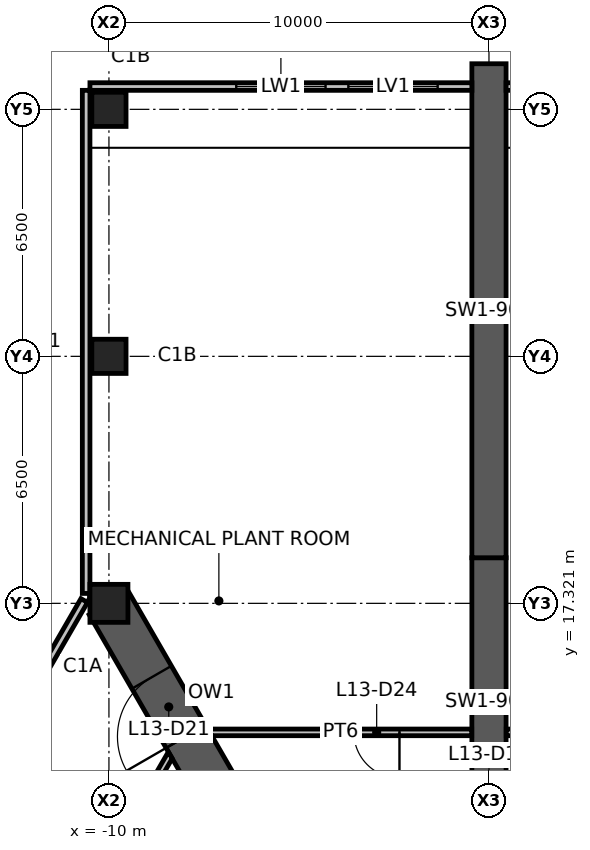
"""IFC4 building model, lengths in metres.
Left out: names, types, materials, properties, quantities, classifications, styles, units other than length and angle.
Written with IfcOpenShell. Run it as: python <this file> out.ifc"""

import sys

from ifc_helpers import new_model, si_unit, direction, frame, frame_2d, origin, origin_2d, place, context, subcontext, project, spatial, polyline, rectangle, hollow_rectangle, outline, extrude, element, fill, save


model = new_model("IFC4")
c1 = context("Model", 3, precision=1e-05, world=origin(), true_north=direction((0.0, 1.0)))
c2 = subcontext(c1, "Body", "Model", "MODEL_VIEW")
j1 = project(units=[si_unit("LENGTHUNIT", "METRE"), si_unit("PLANEANGLEUNIT", "RADIAN")], contexts=[c1])
p1 = place(None, origin())
s1 = spatial("IfcSite", under=j1, at=p1, CompositionType="ELEMENT")
p2 = place(p1, origin())
s2 = spatial("IfcBuilding", under=s1, at=p2, CompositionType="ELEMENT")
p3 = place(p2, frame((0.0, 0.0, 52.0)))
s3 = spatial("IfcBuildingStorey", under=s2, at=p3, CompositionType="ELEMENT", Elevation=52.0)
p4 = place(p3, frame((-10.0, 17.321, 0.0), z_axis=(0.0, 0.0, 1.0), x_axis=(1.0, 0.0, 0.0)))
e1 = element("IfcColumn", 1, at=p4, inside=s3, PredefinedType="COLUMN", context=c2, shape_type="SweptSolid", body=[
    extrude(hollow_rectangle(XDim=1.0, YDim=1.0, WallThickness=0.06, at=origin_2d()), origin(), (0.0, 0.0, 1.0), 5.0),
])
for number, where, z_axis, x_axis in (
    (2, (-10.0, 23.821, 0.0), (0.0, 0.0, 1.0), (1.0, 0.0, 0.0)),
    (3, (-10.0, 30.321, 0.0), (0.0, 0.0, 1.0), (1.0, 0.0, 0.0)),
):
    element("IfcColumn", number, at=place(p3, frame(where, z_axis=z_axis, x_axis=x_axis)), inside=s3, PredefinedType="COLUMN", context=c2, shape_type="SweptSolid", body=[
        extrude(hollow_rectangle(XDim=0.9, YDim=0.9, WallThickness=0.05, at=origin_2d()), origin(), (0.0, 0.0, 1.0), 5.0),
    ])
p5 = place(p3, frame((0.0, 10.925, 0.0), z_axis=(0.0, 0.0, 1.0), x_axis=(0.0, 1.0, 0.0)))
e4 = element("IfcWall", 4, at=p5, inside=s3, PredefinedType="SHEAR", context=c2, shape_type="SweptSolid", body=[
    extrude(rectangle(XDim=7.595, YDim=0.9, at=frame_2d((3.798, 0.0))), origin(), (0.0, 0.0, 1.0), 5.0),
])
p6 = place(p5, frame((0.8, 0.0, 0.0)))
e5 = element("IfcOpeningElement", 5, at=p6, cuts=e4, PredefinedType="OPENING", context=c2, shape_type="SweptSolid", body=[
    extrude(rectangle(XDim=1.0, YDim=2.1, at=frame_2d((0.5, 1.05))), frame((0.0, 0.46, 0.0), z_axis=(0.0, -1.0, 0.0), x_axis=(1.0, 0.0, 0.0)), (0.0, 0.0, 1.0), 0.92),
])
p7 = place(p3, frame((0.0, 18.521, 0.0), z_axis=(0.0, 0.0, 1.0), x_axis=(0.0, 1.0, 0.0)))
e6 = element("IfcWall", 6, at=p7, inside=s3, PredefinedType="SHEAR", context=c2, shape_type="SweptSolid", body=[
    extrude(rectangle(XDim=13.0, YDim=0.9, at=frame_2d((6.5, 0.0))), origin(), (0.0, 0.0, 1.0), 5.0),
])
p8 = place(p3, frame((-6.308, 10.925, -1.15), z_axis=(0.0, 0.0, 1.0), x_axis=(-0.499993363642, 0.866029235253, 0.0)))
e7 = element("IfcWall", 7, at=p8, inside=s3, PredefinedType="SHEAR", context=c2, shape_type="SweptSolid", body=[
    extrude(outline(polyline([(-0.346, -0.6), (3.338, -0.6), (5.138, -0.6), (7.385, -0.6), (7.385, 0.6), (5.138, 0.6), (3.338, 0.6), (-0.346, 0.6), (0.0, 0.0), (-0.346, -0.6)])), origin(), (0.0, 0.0, 1.0), 6.15),
])
p9 = place(p8, frame((3.338, 0.0, 1.15)))
e8 = element("IfcOpeningElement", 8, at=p9, cuts=e7, PredefinedType="OPENING", context=c2, shape_type="SweptSolid", body=[
    extrude(rectangle(XDim=1.8, YDim=2.4, at=frame_2d((0.9, 1.2))), frame((0.0, 0.61, 0.0), z_axis=(0.0, -1.0, 0.0), x_axis=(1.0, 0.0, 0.0)), (0.0, 0.0, 1.0), 1.22),
])
p10 = place(p3, frame((10.5, 30.92, 0.0), z_axis=(0.0, 0.0, 1.0), x_axis=(-1.0, 0.0, 0.0)))
e9 = element("IfcWall", 9, at=p10, inside=s3, PredefinedType="ELEMENTEDWALL", context=c2, shape_type="SweptSolid", body=[
    extrude(rectangle(XDim=10.05, YDim=0.2, at=frame_2d((5.025, 0.0))), origin(), (0.0, 0.0, 1.0), 5.0),
])
p11 = place(p10, frame((3.85, 0.0, 0.6)))
e10 = element("IfcOpeningElement", 10, at=p11, cuts=e9, PredefinedType="OPENING", context=c2, shape_type="SweptSolid", body=[
    extrude(rectangle(XDim=2.35, YDim=3.6, at=frame_2d((1.175, 1.8))), frame((0.0, 0.11, 0.0), z_axis=(0.0, -1.0, 0.0), x_axis=(1.0, 0.0, 0.0)), (0.0, 0.0, 1.0), 0.22),
])
p12 = place(p10, frame((6.8, 0.0, 0.6)))
e11 = element("IfcOpeningElement", 11, at=p12, cuts=e9, PredefinedType="OPENING", context=c2, shape_type="SweptSolid", body=[
    extrude(rectangle(XDim=2.35, YDim=3.6, at=frame_2d((1.175, 1.8))), frame((0.0, 0.11, 0.0), z_axis=(0.0, -1.0, 0.0), x_axis=(1.0, 0.0, 0.0)), (0.0, 0.0, 1.0), 0.22),
])
p13 = place(p3, frame((-0.45, 30.92, 0.0), z_axis=(0.0, 0.0, 1.0), x_axis=(-1.0, 0.0, 0.0)))
e12 = element("IfcWall", 12, at=p13, inside=s3, PredefinedType="ELEMENTEDWALL", context=c2, shape_type="SweptSolid", body=[
    extrude(rectangle(XDim=10.05, YDim=0.2, at=frame_2d((5.025, 0.0))), origin(), (0.0, 0.0, 1.0), 5.0),
])
p14 = place(p13, frame((0.9, 0.0, 0.6)))
e13 = element("IfcOpeningElement", 13, at=p14, cuts=e12, PredefinedType="OPENING", context=c2, shape_type="SweptSolid", body=[
    extrude(rectangle(XDim=2.35, YDim=3.6, at=frame_2d((1.175, 1.8))), frame((0.0, 0.11, 0.0), z_axis=(0.0, -1.0, 0.0), x_axis=(1.0, 0.0, 0.0)), (0.0, 0.0, 1.0), 0.22),
])
p15 = place(p13, frame((3.85, 0.0, 0.6)))
e14 = element("IfcOpeningElement", 14, at=p15, cuts=e12, PredefinedType="OPENING", context=c2, shape_type="SweptSolid", body=[
    extrude(rectangle(XDim=2.35, YDim=3.6, at=frame_2d((1.175, 1.8))), frame((0.0, 0.11, 0.0), z_axis=(0.0, -1.0, 0.0), x_axis=(1.0, 0.0, 0.0)), (0.0, 0.0, 1.0), 0.22),
])
p16 = place(p3, frame((-10.6, 30.821, 0.0), z_axis=(0.0, 0.0, 1.0), x_axis=(0.0, -1.0, 0.0)))
e15 = element("IfcWall", 15, at=p16, inside=s3, PredefinedType="ELEMENTEDWALL", context=c2, shape_type="SweptSolid", body=[
    extrude(rectangle(XDim=13.239, YDim=0.2, at=frame_2d((6.62, 0.0))), origin(), (0.0, 0.0, 1.0), 5.0),
])
p17 = place(p3, frame((-10.65, 17.395, 0.0), z_axis=(0.0, 0.0, 1.0), x_axis=(-0.499999841607, -0.866025495233, 0.0)))
e16 = element("IfcWall", 16, at=p17, inside=s3, PredefinedType="ELEMENTEDWALL", context=c2, shape_type="SweptSolid", body=[
    extrude(rectangle(XDim=19.479, YDim=0.2, at=frame_2d((9.739, 0.0))), origin(), (0.0, 0.0, 1.0), 5.0),
])
p18 = place(p3, frame((7.347, 13.925, 0.0), z_axis=(0.0, 0.0, 1.0), x_axis=(-1.0, 0.0, 0.0)))
e17 = element("IfcWall", 17, at=p18, inside=s3, PredefinedType="PARTITIONING", context=c2, shape_type="SweptSolid", body=[
    extrude(outline(polyline([(-0.051, -0.087), (6.892, -0.087), (6.892, 0.087), (0.051, 0.087), (-0.051, -0.087)])), origin(), (0.0, 0.0, 1.0), 4.83),
])
p19 = place(p3, frame((-0.455, 13.925, 0.0), z_axis=(0.0, 0.0, 1.0), x_axis=(-1.0, 0.0, 0.0)))
e18 = element("IfcWall", 18, at=p19, inside=s3, PredefinedType="PARTITIONING", context=c2, shape_type="SweptSolid", body=[
    extrude(outline(polyline([(0.0, -0.087), (1.9, -0.087), (3.1, -0.087), (6.942, -0.087), (6.841, 0.087), (3.1, 0.087), (1.9, 0.087), (0.0, 0.087), (0.0, -0.087)])), origin(), (0.0, 0.0, 1.0), 4.83),
])
p20 = place(p19, frame((1.9, 0.0, 0.0)))
e19 = element("IfcOpeningElement", 19, at=p20, cuts=e18, PredefinedType="OPENING", context=c2, shape_type="SweptSolid", body=[
    extrude(rectangle(XDim=1.2, YDim=2.1, at=frame_2d((0.6, 1.05))), frame((0.0, 0.098, 0.0), z_axis=(0.0, -1.0, 0.0), x_axis=(1.0, 0.0, 0.0)), (0.0, 0.0, 1.0), 0.195),
])
p21 = place(p3, frame((-8.386, 13.325, 0.0), z_axis=(0.0, 0.0, 1.0), x_axis=(-0.500011547171, -0.866018736919, 0.0)))
e20 = element("IfcWall", 20, at=p21, inside=s3, PredefinedType="PARTITIONING", context=c2, shape_type="SweptSolid", body=[
    extrude(outline(polyline([(-0.051, -0.087), (1.213, -0.087), (2.413, -0.087), (14.744, -0.087), (14.643, 0.087), (2.413, 0.087), (1.213, 0.087), (0.051, 0.087), (-0.051, -0.087)])), origin(), (0.0, 0.0, 1.0), 4.83),
])
p22 = place(p21, frame((1.213, 0.0, 0.0)))
e21 = element("IfcOpeningElement", 21, at=p22, cuts=e20, PredefinedType="OPENING", context=c2, shape_type="SweptSolid", body=[
    extrude(rectangle(XDim=1.2, YDim=2.1, at=frame_2d((0.6, 1.05))), frame((0.0, 0.098, 0.0), z_axis=(0.0, -1.0, 0.0), x_axis=(1.0, 0.0, 0.0)), (0.0, 0.0, 1.0), 0.195),
])
p23 = place(p14, origin())
e22 = element("IfcWindow", 22, at=p23, inside=s3, PartitioningType="SINGLE_PANEL", PredefinedType="USERDEFINED", context=c2, shape_type="SweptSolid", body=[
    extrude(rectangle(XDim=2.35, YDim=3.6, at=frame_2d((1.175, 1.8))), frame((0.0, 0.03, 0.0), z_axis=(0.0, -1.0, 0.0), x_axis=(1.0, 0.0, 0.0)), (0.0, 0.0, 1.0), 0.06),
])
fill(e13, e22)
p24 = place(p15, origin())
e23 = element("IfcWindow", 23, at=p24, inside=s3, PartitioningType="SINGLE_PANEL", PredefinedType="USERDEFINED", context=c2, shape_type="SweptSolid", body=[
    extrude(rectangle(XDim=2.35, YDim=3.6, at=frame_2d((1.175, 1.8))), frame((0.0, 0.03, 0.0), z_axis=(0.0, -1.0, 0.0), x_axis=(1.0, 0.0, 0.0)), (0.0, 0.0, 1.0), 0.06),
])
fill(e14, e23)
p25 = place(p9, origin())
e24 = element("IfcDoor", 24, at=p25, inside=s3, OperationType="DOUBLE_DOOR_SINGLE_SWING", PredefinedType="DOOR", context=c2, shape_type="SweptSolid", body=[
    extrude(rectangle(XDim=1.8, YDim=2.4, at=frame_2d((0.9, 1.2))), frame((0.0, 0.025, 0.0), z_axis=(0.0, -1.0, 0.0), x_axis=(1.0, 0.0, 0.0)), (0.0, 0.0, 1.0), 0.05),
])
fill(e8, e24)
p26 = place(p20, origin())
e25 = element("IfcDoor", 25, at=p26, inside=s3, OperationType="DOUBLE_DOOR_SINGLE_SWING", PredefinedType="DOOR", context=c2, shape_type="SweptSolid", body=[
    extrude(rectangle(XDim=1.2, YDim=2.1, at=frame_2d((0.6, 1.05))), frame((0.0, 0.025, 0.0), z_axis=(0.0, -1.0, 0.0), x_axis=(1.0, 0.0, 0.0)), (0.0, 0.0, 1.0), 0.05),
])
fill(e19, e25)
save(model, sys.argv[1])
